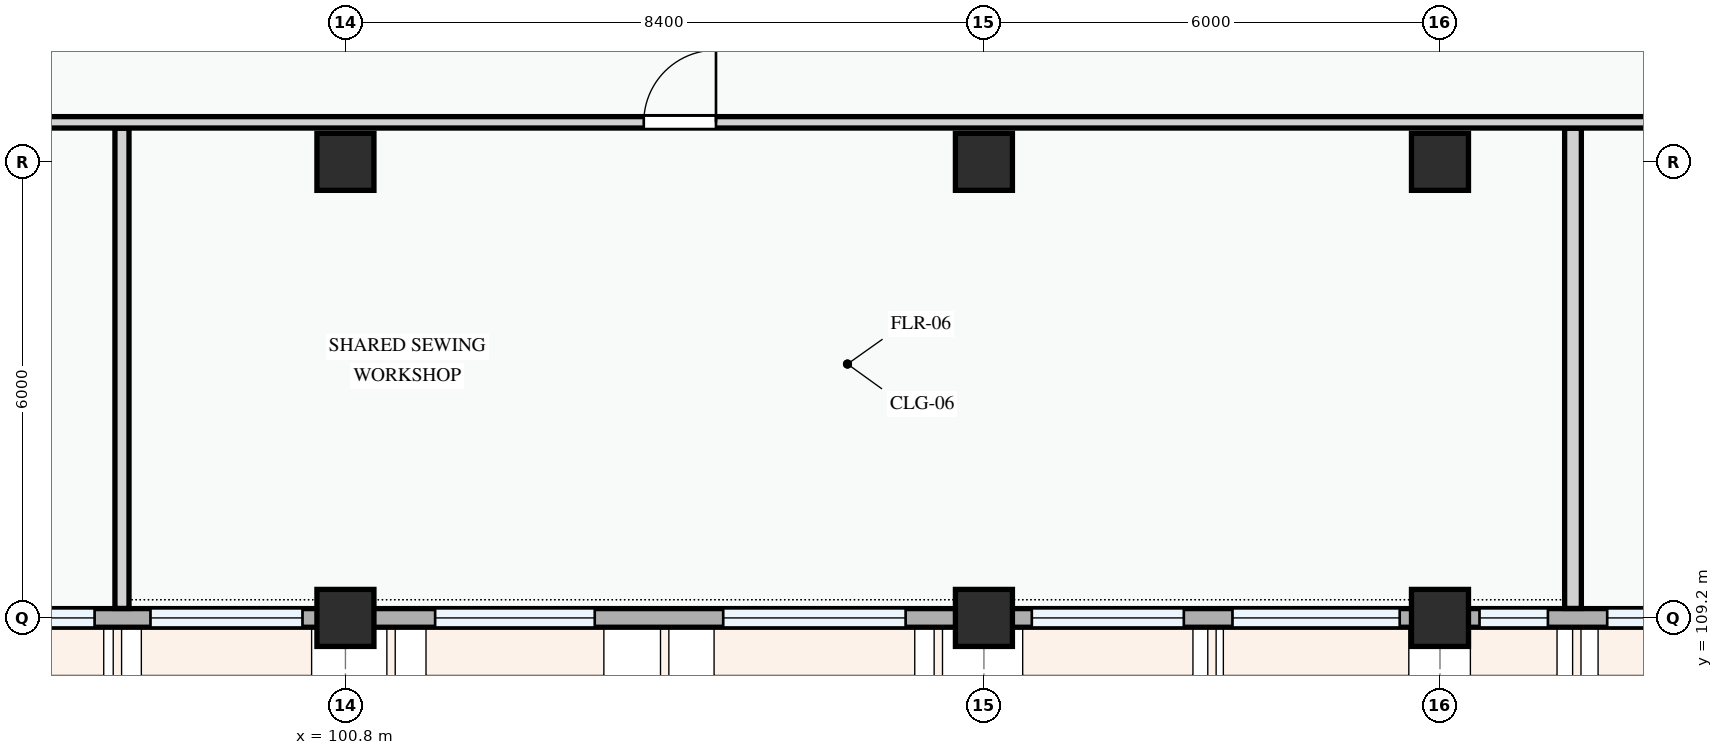
"""IFC4 building model, lengths in metres.
Left out: names, types, materials, properties, quantities, classifications, styles, units other than length and angle.
Written with IfcOpenShell. Run it as: python <this file> out.ifc"""

import sys

from ifc_helpers import new_model, si_unit, direction, frame, frame_2d, origin, origin_2d, place, context, subcontext, project, spatial, rectangle, extrude, element, fill, save


model = new_model("IFC4")
c1 = context("Model", 3, precision=1e-05, world=origin(), true_north=direction((0.0, 1.0)))
c2 = subcontext(c1, "Body", "Model", "MODEL_VIEW")
j1 = project(units=[si_unit("LENGTHUNIT", "METRE"), si_unit("PLANEANGLEUNIT", "RADIAN")], contexts=[c1])
p1 = place(None, origin())
s1 = spatial("IfcSite", under=j1, at=p1, CompositionType="ELEMENT")
p2 = place(p1, origin())
s2 = spatial("IfcBuilding", under=s1, at=p2, CompositionType="ELEMENT")
p3 = place(p2, frame((0.0, 0.0, 4.5)))
s3 = spatial("IfcBuildingStorey", under=s2, at=p3, CompositionType="ELEMENT", Elevation=4.5)
for number, where, z_axis, x_axis in (
    (1, (100.8, 109.2, 0.0), (0.0, 0.0, 1.0), (1.0, 0.0, 0.0)),
    (2, (100.8, 115.2, 0.0), (0.0, 0.0, 1.0), (1.0, 0.0, 0.0)),
    (3, (109.2, 109.2, 0.0), (0.0, 0.0, 1.0), (1.0, 0.0, 0.0)),
    (4, (109.2, 115.2, 0.0), (0.0, 0.0, 1.0), (1.0, 0.0, 0.0)),
    (5, (115.2, 109.2, 0.0), (0.0, 0.0, 1.0), (1.0, 0.0, 0.0)),
    (6, (115.2, 115.2, 0.0), (0.0, 0.0, 1.0), (1.0, 0.0, 0.0)),
):
    element("IfcColumn", number, at=place(p3, frame(where, z_axis=z_axis, x_axis=x_axis)), inside=s3, PredefinedType="COLUMN", context=c2, shape_type="SweptSolid", body=[
        extrude(rectangle(XDim=0.75, YDim=0.75, at=origin_2d()), origin(), (0.0, 0.0, 1.0), 3.6),
    ])
p4 = place(p3, frame((94.8, 109.2, 0.0), z_axis=(0.0, 0.0, 1.0), x_axis=(1.0, 0.0, 0.0)))
e7 = element("IfcWall", 7, at=p4, inside=s3, PredefinedType="STANDARD", context=c2, shape_type="SweptSolid", body=[
    extrude(rectangle(XDim=6.0, YDim=0.245, at=frame_2d((3.0, 0.0))), origin(), (0.0, 0.0, 1.0), 2.775),
])
p5 = place(p4, frame((0.55, 0.0, 0.78)))
e8 = element("IfcOpeningElement", 8, at=p5, cuts=e7, PredefinedType="OPENING", context=c2, shape_type="SweptSolid", body=[
    extrude(rectangle(XDim=2.15, YDim=1.65, at=frame_2d((1.075, 0.825))), frame((0.0, 0.133, 0.0), z_axis=(0.0, -1.0, 0.0), x_axis=(1.0, 0.0, 0.0)), (0.0, 0.0, 1.0), 0.265),
])
p6 = place(p4, frame((3.435, 0.0, 0.78)))
e9 = element("IfcOpeningElement", 9, at=p6, cuts=e7, PredefinedType="OPENING", context=c2, shape_type="SweptSolid", body=[
    extrude(rectangle(XDim=2.0, YDim=1.75, at=frame_2d((1.0, 0.875))), frame((0.0, 0.133, 0.0), z_axis=(0.0, -1.0, 0.0), x_axis=(1.0, 0.0, 0.0)), (0.0, 0.0, 1.0), 0.265),
])
p7 = place(p3, frame((100.8, 109.2, 0.0), z_axis=(0.0, 0.0, 1.0), x_axis=(1.0, 0.0, 0.0)))
e10 = element("IfcWall", 10, at=p7, inside=s3, PredefinedType="STANDARD", context=c2, shape_type="SweptSolid", body=[
    extrude(rectangle(XDim=8.4, YDim=0.245, at=frame_2d((4.2, 0.0))), origin(), (0.0, 0.0, 1.0), 2.675),
])
p8 = place(p7, frame((1.18, 0.0, 0.78)))
e11 = element("IfcOpeningElement", 11, at=p8, cuts=e10, PredefinedType="OPENING", context=c2, shape_type="SweptSolid", body=[
    extrude(rectangle(XDim=2.1, YDim=1.55, at=frame_2d((1.05, 0.775))), frame((0.0, 0.133, 0.0), z_axis=(0.0, -1.0, 0.0), x_axis=(1.0, 0.0, 0.0)), (0.0, 0.0, 1.0), 0.265),
])
p9 = place(p7, frame((4.97, 0.0, 0.78)))
e12 = element("IfcOpeningElement", 12, at=p9, cuts=e10, PredefinedType="OPENING", context=c2, shape_type="SweptSolid", body=[
    extrude(rectangle(XDim=2.4, YDim=1.65, at=frame_2d((1.2, 0.825))), frame((0.0, 0.133, 0.0), z_axis=(0.0, -1.0, 0.0), x_axis=(1.0, 0.0, 0.0)), (0.0, 0.0, 1.0), 0.265),
])
p10 = place(p3, frame((109.2, 109.2, 0.0), z_axis=(0.0, 0.0, 1.0), x_axis=(1.0, 0.0, 0.0)))
e13 = element("IfcWall", 13, at=p10, inside=s3, PredefinedType="STANDARD", context=c2, shape_type="SweptSolid", body=[
    extrude(rectangle(XDim=6.0, YDim=0.245, at=frame_2d((3.0, 0.0))), origin(), (0.0, 0.0, 1.0), 2.775),
])
p11 = place(p10, frame((0.63, 0.0, 0.78)))
e14 = element("IfcOpeningElement", 14, at=p11, cuts=e13, PredefinedType="OPENING", context=c2, shape_type="SweptSolid", body=[
    extrude(rectangle(XDim=2.0, YDim=1.5, at=frame_2d((1.0, 0.75))), frame((0.0, 0.133, 0.0), z_axis=(0.0, -1.0, 0.0), x_axis=(1.0, 0.0, 0.0)), (0.0, 0.0, 1.0), 0.265),
])
p12 = place(p10, frame((3.27, 0.0, 0.78)))
e15 = element("IfcOpeningElement", 15, at=p12, cuts=e13, PredefinedType="OPENING", context=c2, shape_type="SweptSolid", body=[
    extrude(rectangle(XDim=2.2, YDim=1.75, at=frame_2d((1.1, 0.875))), frame((0.0, 0.133, 0.0), z_axis=(0.0, -1.0, 0.0), x_axis=(1.0, 0.0, 0.0)), (0.0, 0.0, 1.0), 0.265),
])
p13 = place(p3, frame((115.2, 109.2, 0.0), z_axis=(0.0, 0.0, 1.0), x_axis=(1.0, 0.0, 0.0)))
e16 = element("IfcWall", 16, at=p13, inside=s3, PredefinedType="STANDARD", context=c2, shape_type="SweptSolid", body=[
    extrude(rectangle(XDim=8.4, YDim=0.245, at=frame_2d((4.2, 0.0))), origin(), (0.0, 0.0, 1.0), 2.675),
])
p14 = place(p13, frame((0.52, 0.0, 0.78)))
e17 = element("IfcOpeningElement", 17, at=p14, cuts=e16, PredefinedType="OPENING", context=c2, shape_type="SweptSolid", body=[
    extrude(rectangle(XDim=0.9, YDim=1.2, at=frame_2d((0.45, 0.6))), frame((0.0, 0.133, 0.0), z_axis=(0.0, -1.0, 0.0), x_axis=(1.0, 0.0, 0.0)), (0.0, 0.0, 1.0), 0.265),
])
p15 = place(p13, frame((2.2, 0.0, 0.78)))
e18 = element("IfcOpeningElement", 18, at=p15, cuts=e16, PredefinedType="OPENING", context=c2, shape_type="SweptSolid", body=[
    extrude(rectangle(XDim=2.4, YDim=1.65, at=frame_2d((1.2, 0.825))), frame((0.0, 0.133, 0.0), z_axis=(0.0, -1.0, 0.0), x_axis=(1.0, 0.0, 0.0)), (0.0, 0.0, 1.0), 0.265),
])
p16 = place(p13, frame((5.935, 0.0, 0.78)))
e19 = element("IfcOpeningElement", 19, at=p16, cuts=e16, PredefinedType="OPENING", context=c2, shape_type="SweptSolid", body=[
    extrude(rectangle(XDim=1.25, YDim=1.3, at=frame_2d((0.625, 0.65))), frame((0.0, 0.133, 0.0), z_axis=(0.0, -1.0, 0.0), x_axis=(1.0, 0.0, 0.0)), (0.0, 0.0, 1.0), 0.265),
])
p17 = place(p3, frame((97.86, 109.324, 0.0), z_axis=(0.0, 0.0, 1.0), x_axis=(0.0, 1.0, 0.0)))
e20 = element("IfcWall", 20, at=p17, inside=s3, PredefinedType="PARTITIONING", context=c2, shape_type="SweptSolid", body=[
    extrude(rectangle(XDim=6.319, YDim=0.185, at=frame_2d((3.159, 0.0))), origin(), (0.0, 0.0, 1.0), 3.3),
])
p18 = place(p3, frame((116.95, 109.324, 0.0), z_axis=(0.0, 0.0, 1.0), x_axis=(0.0, 1.0, 0.0)))
e21 = element("IfcWall", 21, at=p18, inside=s3, PredefinedType="PARTITIONING", context=c2, shape_type="SweptSolid", body=[
    extrude(rectangle(XDim=6.319, YDim=0.22, at=frame_2d((3.159, 0.0))), origin(), (0.0, 0.0, 1.0), 3.3),
])
p19 = place(p3, frame((80.524, 115.72, 0.0), z_axis=(0.0, 0.0, 1.0), x_axis=(1.0, 0.0, 0.0)))
e22 = element("IfcWall", 22, at=p19, inside=s3, PredefinedType="PARTITIONING", context=c2, shape_type="SweptSolid", body=[
    extrude(rectangle(XDim=69.526, YDim=0.15, at=frame_2d((34.763, 0.0))), origin(), (0.0, 0.0, 1.0), 3.3),
])
p20 = place(p19, frame((9.656, 0.0, 0.0)))
e23 = element("IfcOpeningElement", 23, at=p20, cuts=e22, PredefinedType="OPENING", context=c2, shape_type="SweptSolid", body=[
    extrude(rectangle(XDim=0.95, YDim=2.1, at=frame_2d((0.475, 1.05))), frame((0.0, 0.085, 0.0), z_axis=(0.0, -1.0, 0.0), x_axis=(1.0, 0.0, 0.0)), (0.0, 0.0, 1.0), 0.17),
])
p21 = place(p19, frame((24.2, 0.0, 0.0)))
e24 = element("IfcOpeningElement", 24, at=p21, cuts=e22, PredefinedType="OPENING", context=c2, shape_type="SweptSolid", body=[
    extrude(rectangle(XDim=0.95, YDim=2.1, at=frame_2d((0.475, 1.05))), frame((0.0, 0.085, 0.0), z_axis=(0.0, -1.0, 0.0), x_axis=(1.0, 0.0, 0.0)), (0.0, 0.0, 1.0), 0.17),
])
p22 = place(p19, frame((38.208, 0.0, 0.0)))
e25 = element("IfcOpeningElement", 25, at=p22, cuts=e22, PredefinedType="OPENING", context=c2, shape_type="SweptSolid", body=[
    extrude(rectangle(XDim=0.95, YDim=2.1, at=frame_2d((0.475, 1.05))), frame((0.0, 0.085, 0.0), z_axis=(0.0, -1.0, 0.0), x_axis=(1.0, 0.0, 0.0)), (0.0, 0.0, 1.0), 0.17),
])
p23 = place(p19, frame((67.026, 0.0, 0.0)))
e26 = element("IfcOpeningElement", 26, at=p23, cuts=e22, PredefinedType="OPENING", context=c2, shape_type="SweptSolid", body=[
    extrude(rectangle(XDim=0.95, YDim=2.1, at=frame_2d((0.475, 1.05))), frame((0.0, 0.085, 0.0), z_axis=(0.0, -1.0, 0.0), x_axis=(1.0, 0.0, 0.0)), (0.0, 0.0, 1.0), 0.17),
])
p24 = place(p5, origin())
e27 = element("IfcWindow", 27, at=p24, inside=s3, PartitioningType="DOUBLE_PANEL_VERTICAL", PredefinedType="WINDOW", context=c2, shape_type="SweptSolid", body=[
    extrude(rectangle(XDim=2.15, YDim=1.65, at=frame_2d((1.075, 0.825))), frame((0.0, 0.03, 0.0), z_axis=(0.0, -1.0, 0.0), x_axis=(1.0, 0.0, 0.0)), (0.0, 0.0, 1.0), 0.06),
])
fill(e8, e27)
p25 = place(p6, origin())
e28 = element("IfcWindow", 28, at=p25, inside=s3, PartitioningType="DOUBLE_PANEL_VERTICAL", PredefinedType="WINDOW", context=c2, shape_type="SweptSolid", body=[
    extrude(rectangle(XDim=2.0, YDim=1.75, at=frame_2d((1.0, 0.875))), frame((0.0, 0.03, 0.0), z_axis=(0.0, -1.0, 0.0), x_axis=(1.0, 0.0, 0.0)), (0.0, 0.0, 1.0), 0.06),
])
fill(e9, e28)
p26 = place(p8, origin())
e29 = element("IfcWindow", 29, at=p26, inside=s3, PartitioningType="DOUBLE_PANEL_VERTICAL", PredefinedType="WINDOW", context=c2, shape_type="SweptSolid", body=[
    extrude(rectangle(XDim=2.1, YDim=1.55, at=frame_2d((1.05, 0.775))), frame((0.0, 0.03, 0.0), z_axis=(0.0, -1.0, 0.0), x_axis=(1.0, 0.0, 0.0)), (0.0, 0.0, 1.0), 0.06),
])
fill(e11, e29)
p27 = place(p9, origin())
e30 = element("IfcWindow", 30, at=p27, inside=s3, PartitioningType="DOUBLE_PANEL_VERTICAL", PredefinedType="WINDOW", context=c2, shape_type="SweptSolid", body=[
    extrude(rectangle(XDim=2.4, YDim=1.65, at=frame_2d((1.2, 0.825))), frame((0.0, 0.03, 0.0), z_axis=(0.0, -1.0, 0.0), x_axis=(1.0, 0.0, 0.0)), (0.0, 0.0, 1.0), 0.06),
])
fill(e12, e30)
p28 = place(p11, origin())
e31 = element("IfcWindow", 31, at=p28, inside=s3, PartitioningType="DOUBLE_PANEL_VERTICAL", PredefinedType="WINDOW", context=c2, shape_type="SweptSolid", body=[
    extrude(rectangle(XDim=2.0, YDim=1.5, at=frame_2d((1.0, 0.75))), frame((0.0, 0.03, 0.0), z_axis=(0.0, -1.0, 0.0), x_axis=(1.0, 0.0, 0.0)), (0.0, 0.0, 1.0), 0.06),
])
fill(e14, e31)
p29 = place(p12, origin())
e32 = element("IfcWindow", 32, at=p29, inside=s3, PartitioningType="DOUBLE_PANEL_VERTICAL", PredefinedType="WINDOW", context=c2, shape_type="SweptSolid", body=[
    extrude(rectangle(XDim=2.2, YDim=1.75, at=frame_2d((1.1, 0.875))), frame((0.0, 0.03, 0.0), z_axis=(0.0, -1.0, 0.0), x_axis=(1.0, 0.0, 0.0)), (0.0, 0.0, 1.0), 0.06),
])
fill(e15, e32)
p30 = place(p14, origin())
e33 = element("IfcWindow", 33, at=p30, inside=s3, PartitioningType="SINGLE_PANEL", PredefinedType="WINDOW", context=c2, shape_type="SweptSolid", body=[
    extrude(rectangle(XDim=0.9, YDim=1.2, at=frame_2d((0.45, 0.6))), frame((0.0, 0.03, 0.0), z_axis=(0.0, -1.0, 0.0), x_axis=(1.0, 0.0, 0.0)), (0.0, 0.0, 1.0), 0.06),
])
fill(e17, e33)
p31 = place(p15, origin())
e34 = element("IfcWindow", 34, at=p31, inside=s3, PartitioningType="DOUBLE_PANEL_VERTICAL", PredefinedType="WINDOW", context=c2, shape_type="SweptSolid", body=[
    extrude(rectangle(XDim=2.4, YDim=1.65, at=frame_2d((1.2, 0.825))), frame((0.0, 0.03, 0.0), z_axis=(0.0, -1.0, 0.0), x_axis=(1.0, 0.0, 0.0)), (0.0, 0.0, 1.0), 0.06),
])
fill(e18, e34)
p32 = place(p21, origin())
e35 = element("IfcDoor", 35, at=p32, inside=s3, OperationType="SINGLE_SWING_RIGHT", PredefinedType="DOOR", context=c2, shape_type="SweptSolid", body=[
    extrude(rectangle(XDim=0.95, YDim=2.1, at=frame_2d((0.475, 1.05))), frame((0.0, 0.025, 0.0), z_axis=(0.0, -1.0, 0.0), x_axis=(1.0, 0.0, 0.0)), (0.0, 0.0, 1.0), 0.05),
])
fill(e24, e35)
save(model, sys.argv[1])
